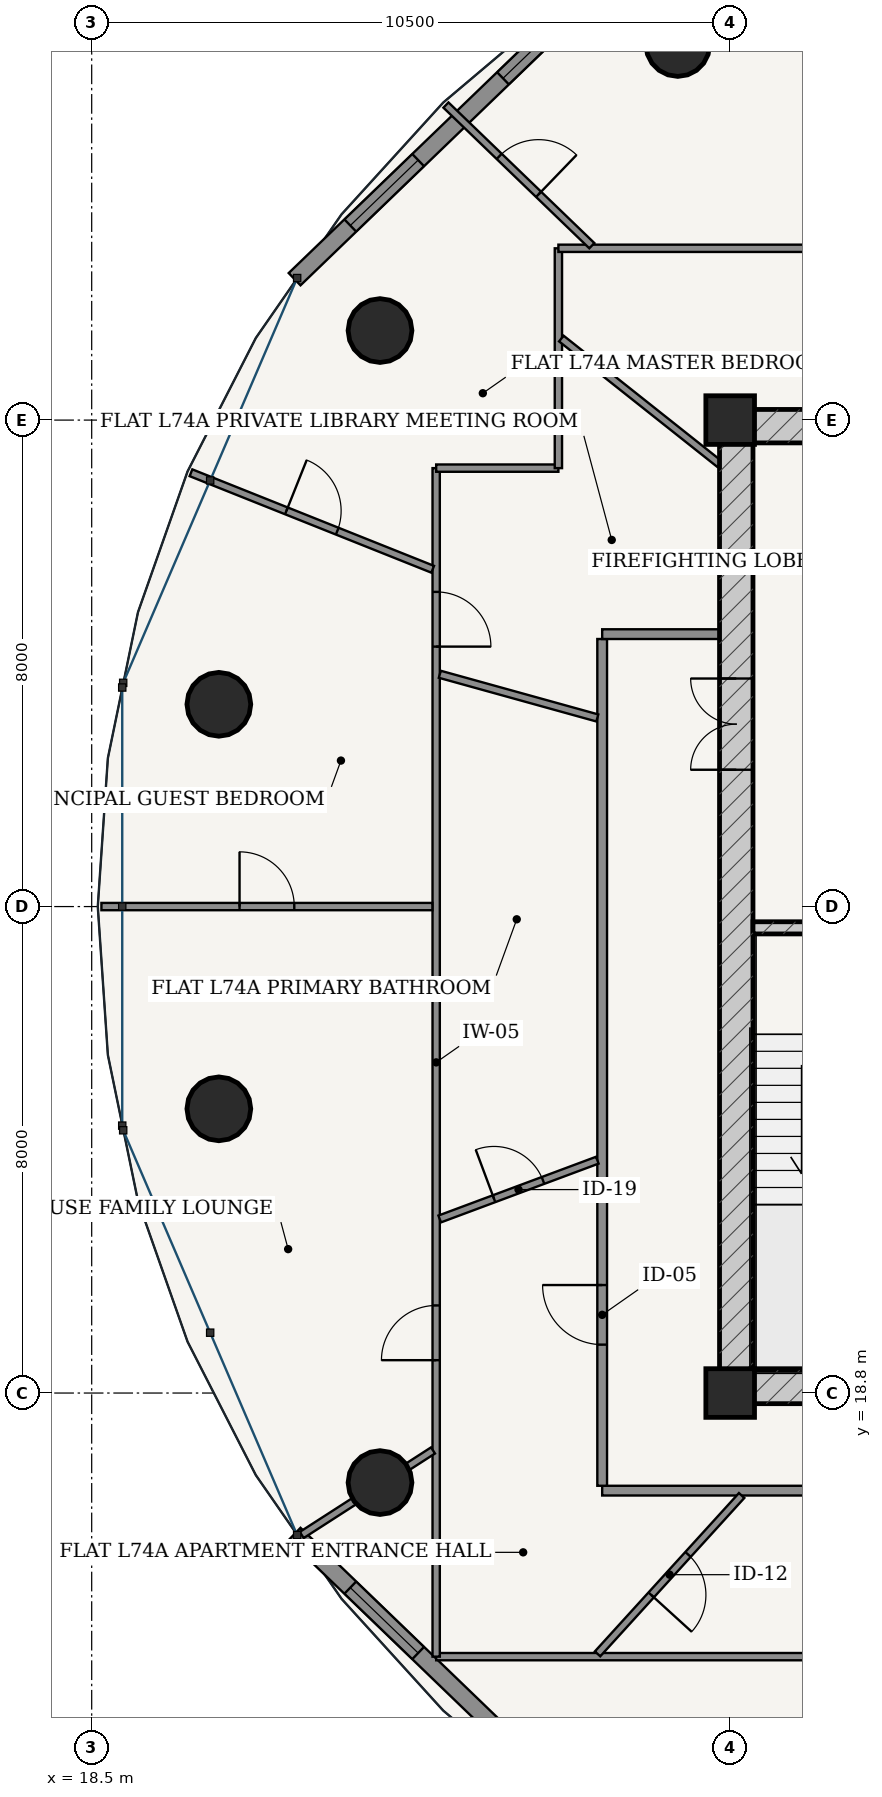
"""IFC4 building model, lengths in metres.
Left out: names, types, materials, properties, quantities, classifications, styles, units other than length and angle.
Written with IfcOpenShell. Run it as: python <this file> out.ifc"""

import sys

from ifc_helpers import new_model, si_unit, direction, frame, frame_2d, origin, origin_2d, place, context, subcontext, project, spatial, rectangle, hollow_circle, extrude, source, transform, mapped, element, fill, save


model = new_model("IFC4")
c1 = context("Model", 3, precision=1e-05, world=origin(), true_north=direction((-0.2419218956, 0.970295726276)))
c2 = subcontext(c1, "Body", "Model", "MODEL_VIEW")
j1 = project(units=[si_unit("LENGTHUNIT", "METRE"), si_unit("PLANEANGLEUNIT", "RADIAN")], contexts=[c1])
p1 = place(None, origin())
s1 = spatial("IfcSite", under=j1, at=p1, CompositionType="ELEMENT")
p2 = place(p1, origin())
s2 = spatial("IfcBuilding", under=s1, at=p2, CompositionType="ELEMENT")
p3 = place(p2, frame((0.0, 0.0, 281.95)))
s3 = spatial("IfcBuildingStorey", under=s2, at=p3, CompositionType="ELEMENT", Elevation=281.95)
for number, where, z_axis, x_axis in (
    (1, (29.0, 18.8, 0.0), (0.0, 0.0, 1.0), (1.0, 0.0, 0.0)),
    (2, (29.0, 34.8, 0.0), (0.0, 0.0, 1.0), (1.0, 0.0, 0.0)),
):
    element("IfcColumn", number, at=place(p3, frame(where, z_axis=z_axis, x_axis=x_axis)), inside=s3, PredefinedType="COLUMN", context=c2, shape_type="SweptSolid", body=[
        extrude(rectangle(XDim=0.8, YDim=0.8, at=origin_2d()), origin(), (0.0, 0.0, 1.0), 3.75),
    ])
p4 = place(p3, frame((28.825, 18.9, 0.0), z_axis=(0.0, 0.0, 1.0), x_axis=(1.0, 0.0, 0.0)))
e3 = element("IfcWall", 3, at=p4, inside=s3, PredefinedType="SHEAR", context=c2, shape_type="SweptSolid", body=[
    extrude(rectangle(XDim=18.35, YDim=0.55, at=frame_2d((9.175, 0.0))), origin(), (0.0, 0.0, 1.0), 3.49),
])
p5 = place(p4, frame((7.41, 0.0, 0.0)))
e4 = element("IfcOpeningElement", 4, at=p5, cuts=e3, PredefinedType="OPENING", context=c2, shape_type="SweptSolid", body=[
    extrude(rectangle(XDim=0.85, YDim=2.1, at=frame_2d((0.425, 1.05))), frame((0.0, 0.285, 0.0), z_axis=(0.0, -1.0, 0.0), x_axis=(1.0, 0.0, 0.0)), (0.0, 0.0, 1.0), 0.57),
])
p6 = place(p4, frame((10.49, 0.0, 0.0)))
e5 = element("IfcOpeningElement", 5, at=p6, cuts=e3, PredefinedType="OPENING", context=c2, shape_type="SweptSolid", body=[
    extrude(rectangle(XDim=0.85, YDim=2.1, at=frame_2d((0.425, 1.05))), frame((0.0, 0.285, 0.0), z_axis=(0.0, -1.0, 0.0), x_axis=(1.0, 0.0, 0.0)), (0.0, 0.0, 1.0), 0.57),
])
p7 = place(p3, frame((28.825, 34.7, 0.0), z_axis=(0.0, 0.0, 1.0), x_axis=(1.0, 0.0, 0.0)))
e6 = element("IfcWall", 6, at=p7, inside=s3, PredefinedType="SHEAR", context=c2, shape_type="SweptSolid", body=[
    extrude(rectangle(XDim=18.35, YDim=0.55, at=frame_2d((9.175, 0.0))), origin(), (0.0, 0.0, 1.0), 3.49),
])
p8 = place(p3, frame((29.1, 19.175, 0.0), z_axis=(0.0, 0.0, 1.0), x_axis=(0.0, 1.0, 0.0)))
e7 = element("IfcWall", 7, at=p8, inside=s3, PredefinedType="SHEAR", context=c2, shape_type="SweptSolid", body=[
    extrude(rectangle(XDim=15.25, YDim=0.55, at=frame_2d((7.625, 0.0))), origin(), (0.0, 0.0, 1.0), 3.49),
])
p9 = place(p8, frame((9.875, 0.0, 0.0)))
e8 = element("IfcOpeningElement", 8, at=p9, cuts=e7, PredefinedType="OPENING", context=c2, shape_type="SweptSolid", body=[
    extrude(rectangle(XDim=1.5, YDim=2.2, at=frame_2d((0.75, 1.1))), frame((0.0, 0.285, 0.0), z_axis=(0.0, -1.0, 0.0), x_axis=(1.0, 0.0, 0.0)), (0.0, 0.0, 1.0), 0.57),
])
p10 = place(p3, frame((29.375, 26.45, 0.0), z_axis=(0.0, 0.0, 1.0), x_axis=(1.0, 0.0, 0.0)))
e9 = element("IfcWall", 9, at=p10, inside=s3, PredefinedType="SOLIDWALL", context=c2, shape_type="SweptSolid", body=[
    extrude(rectangle(XDim=3.32, YDim=0.2, at=frame_2d((1.66, 0.0))), origin(), (0.0, 0.0, 1.0), 3.49),
])
p11 = place(p10, frame((1.185, 0.0, 0.0)))
e10 = element("IfcOpeningElement", 10, at=p11, cuts=e9, PredefinedType="OPENING", context=c2, shape_type="SweptSolid", body=[
    extrude(rectangle(XDim=0.95, YDim=2.15, at=frame_2d((0.475, 1.075))), frame((0.0, 0.11, 0.0), z_axis=(0.0, -1.0, 0.0), x_axis=(1.0, 0.0, 0.0)), (0.0, 0.0, 1.0), 0.22),
])
for number, where, z_axis, x_axis in (
    (11, (28.139, 40.977, 0.0), (0.0, 0.0, 1.0), (1.0, 0.0, 0.0)),
    (12, (23.241, 36.272, 0.0), (0.0, 0.0, 1.0), (1.0, 0.0, 0.0)),
    (13, (20.591, 30.126, 0.0), (0.0, 0.0, 1.0), (1.0, 0.0, 0.0)),
    (14, (20.591, 23.474, 0.0), (0.0, 0.0, 1.0), (1.0, 0.0, 0.0)),
    (15, (23.241, 17.328, 0.0), (0.0, 0.0, 1.0), (1.0, 0.0, 0.0)),
):
    element("IfcColumn", number, at=place(p3, frame(where, z_axis=z_axis, x_axis=x_axis)), inside=s3, PredefinedType="COLUMN", context=c2, shape_type="SweptSolid", body=[
        extrude(hollow_circle(Radius=0.525, WallThickness=0.035, at=origin_2d()), origin(), (0.0, 0.0, 1.0), 3.75),
    ])
p12 = place(p3, frame((27.296, 42.379, 0.0), z_axis=(0.0, 0.0, 1.0), x_axis=(-0.719979309073, -0.693995529169, 0.0)))
e16 = element("IfcWall", 16, at=p12, inside=s3, PredefinedType="SOLIDWALL", context=c2, shape_type="SweptSolid", body=[
    extrude(rectangle(XDim=7.583, YDim=0.28, at=frame_2d((3.791, 0.0))), origin(), (0.0, 0.0, 1.0), 3.49),
])
p13 = place(p12, frame((1.272, 0.0, 0.85)))
e17 = element("IfcOpeningElement", 17, at=p13, cuts=e16, PredefinedType="OPENING", context=c2, shape_type="SweptSolid", body=[
    extrude(rectangle(XDim=1.55, YDim=1.95, at=frame_2d((0.775, 0.975))), frame((0.0, 0.15, 0.0), z_axis=(0.0, -1.0, 0.0), x_axis=(1.0, 0.0, 0.0)), (0.0, 0.0, 1.0), 0.3),
])
p14 = place(p12, frame((4.76, 0.0, 0.85)))
e18 = element("IfcOpeningElement", 18, at=p14, cuts=e16, PredefinedType="OPENING", context=c2, shape_type="SweptSolid", body=[
    extrude(rectangle(XDim=1.55, YDim=1.95, at=frame_2d((0.775, 0.975))), frame((0.0, 0.15, 0.0), z_axis=(0.0, -1.0, 0.0), x_axis=(1.0, 0.0, 0.0)), (0.0, 0.0, 1.0), 0.3),
])
p15 = place(p3, frame((21.837, 16.483, 0.0), z_axis=(0.0, 0.0, 1.0), x_axis=(0.719995397366, -0.69397883813, 0.0)))
e19 = element("IfcWall", 19, at=p15, inside=s3, PredefinedType="SOLIDWALL", context=c2, shape_type="SweptSolid", body=[
    extrude(rectangle(XDim=7.582, YDim=0.28, at=frame_2d((3.791, 0.0))), origin(), (0.0, 0.0, 1.0), 3.49),
])
p16 = place(p15, frame((1.272, 0.0, 0.85)))
e20 = element("IfcOpeningElement", 20, at=p16, cuts=e19, PredefinedType="OPENING", context=c2, shape_type="SweptSolid", body=[
    extrude(rectangle(XDim=1.55, YDim=1.95, at=frame_2d((0.775, 0.975))), frame((0.0, 0.15, 0.0), z_axis=(0.0, -1.0, 0.0), x_axis=(1.0, 0.0, 0.0)), (0.0, 0.0, 1.0), 0.3),
])
p17 = place(p15, frame((4.76, 0.0, 0.85)))
e21 = element("IfcOpeningElement", 21, at=p17, cuts=e19, PredefinedType="OPENING", context=c2, shape_type="SweptSolid", body=[
    extrude(rectangle(XDim=1.55, YDim=1.95, at=frame_2d((0.775, 0.975))), frame((0.0, 0.15, 0.0), z_axis=(0.0, -1.0, 0.0), x_axis=(1.0, 0.0, 0.0)), (0.0, 0.0, 1.0), 0.3),
])
p18 = place(p3, frame((26.895, 17.195, 0.0), z_axis=(0.0, 0.0, 1.0), x_axis=(1.0, 0.0, 0.0)))
e22 = element("IfcWall", 22, at=p18, inside=s3, PredefinedType="PARTITIONING", context=c2, shape_type="SweptSolid", body=[
    extrude(rectangle(XDim=22.21, YDim=0.16, at=frame_2d((11.105, 0.0))), origin(), (0.0, 0.0, 1.0), 3.015),
])
p19 = place(p18, frame((17.365, 0.0, 0.0)))
e23 = element("IfcOpeningElement", 23, at=p19, cuts=e22, PredefinedType="OPENING", context=c2, shape_type="SweptSolid", body=[
    extrude(rectangle(XDim=0.98, YDim=2.2, at=frame_2d((0.49, 1.1))), frame((0.0, 0.09, 0.0), z_axis=(0.0, -1.0, 0.0), x_axis=(1.0, 0.0, 0.0)), (0.0, 0.0, 1.0), 0.18),
])
p20 = place(p3, frame((26.895, 17.275, 0.0), z_axis=(0.0, 0.0, 1.0), x_axis=(0.0, 1.0, 0.0)))
e24 = element("IfcWall", 24, at=p20, inside=s3, PredefinedType="PARTITIONING", context=c2, shape_type="SweptSolid", body=[
    extrude(rectangle(XDim=13.925, YDim=0.16, at=frame_2d((6.962, 0.0))), origin(), (0.0, 0.0, 1.0), 3.015),
])
p21 = place(p20, frame((2.321, 0.0, 0.0)))
e25 = element("IfcOpeningElement", 25, at=p21, cuts=e24, PredefinedType="OPENING", context=c2, shape_type="SweptSolid", body=[
    extrude(rectangle(XDim=0.98, YDim=2.2, at=frame_2d((0.49, 1.1))), frame((0.0, 0.09, 0.0), z_axis=(0.0, -1.0, 0.0), x_axis=(1.0, 0.0, 0.0)), (0.0, 0.0, 1.0), 0.18),
])
p22 = place(p3, frame((26.895, 31.28, 0.0), z_axis=(0.0, 0.0, 1.0), x_axis=(1.0, 0.0, 0.0)))
e26 = element("IfcWall", 26, at=p22, inside=s3, PredefinedType="PARTITIONING", context=c2, shape_type="SweptSolid", body=[
    extrude(rectangle(XDim=1.93, YDim=0.16, at=frame_2d((0.965, 0.0))), origin(), (0.0, 0.0, 1.0), 3.49),
])
p23 = place(p3, frame((35.353, 14.465, 0.0), z_axis=(0.0, 0.0, 1.0), x_axis=(-1.0, 0.0, 0.0)))
e27 = element("IfcWall", 27, at=p23, inside=s3, PredefinedType="PARTITIONING", context=c2, shape_type="SweptSolid", body=[
    extrude(rectangle(XDim=11.188, YDim=0.12, at=frame_2d((5.594, 0.0))), origin(), (0.0, 0.0, 1.0), 3.015),
])
p24 = place(p23, frame((3.997, 0.0, 0.0)))
e28 = element("IfcOpeningElement", 28, at=p24, cuts=e27, PredefinedType="OPENING", context=c2, shape_type="SweptSolid", body=[
    extrude(rectangle(XDim=0.9, YDim=2.15, at=frame_2d((0.45, 1.075))), frame((0.0, 0.07, 0.0), z_axis=(0.0, -1.0, 0.0), x_axis=(1.0, 0.0, 0.0)), (0.0, 0.0, 1.0), 0.14),
])
p25 = place(p3, frame((24.165, 14.465, 0.0), z_axis=(0.0, 0.0, 1.0), x_axis=(0.0, 1.0, 0.0)))
e29 = element("IfcWall", 29, at=p25, inside=s3, PredefinedType="PARTITIONING", context=c2, shape_type="SweptSolid", body=[
    extrude(rectangle(XDim=19.545, YDim=0.12, at=frame_2d((9.772, 0.0))), origin(), (0.0, 0.0, 1.0), 3.015),
])
p26 = place(p25, frame((4.875, 0.0, 0.0)))
e30 = element("IfcOpeningElement", 30, at=p26, cuts=e29, PredefinedType="OPENING", context=c2, shape_type="SweptSolid", body=[
    extrude(rectangle(XDim=0.9, YDim=2.15, at=frame_2d((0.45, 1.075))), frame((0.0, 0.07, 0.0), z_axis=(0.0, -1.0, 0.0), x_axis=(1.0, 0.0, 0.0)), (0.0, 0.0, 1.0), 0.14),
])
p27 = place(p25, frame((16.61, 0.0, 0.0)))
e31 = element("IfcOpeningElement", 31, at=p27, cuts=e29, PredefinedType="OPENING", context=c2, shape_type="SweptSolid", body=[
    extrude(rectangle(XDim=0.9, YDim=2.15, at=frame_2d((0.45, 1.075))), frame((0.0, 0.07, 0.0), z_axis=(0.0, -1.0, 0.0), x_axis=(1.0, 0.0, 0.0)), (0.0, 0.0, 1.0), 0.14),
])
p28 = place(p3, frame((24.165, 34.01, 0.0), z_axis=(0.0, 0.0, 1.0), x_axis=(1.0, 0.0, 0.0)))
e32 = element("IfcWall", 32, at=p28, inside=s3, PredefinedType="PARTITIONING", context=c2, shape_type="SweptSolid", body=[
    extrude(rectangle(XDim=2.01, YDim=0.12, at=frame_2d((1.005, 0.0))), origin(), (0.0, 0.0, 1.0), 3.209),
])
p29 = place(p3, frame((26.175, 34.01, 0.0), z_axis=(0.0, 0.0, 1.0), x_axis=(0.0, 1.0, 0.0)))
e33 = element("IfcWall", 33, at=p29, inside=s3, PredefinedType="PARTITIONING", context=c2, shape_type="SweptSolid", body=[
    extrude(rectangle(XDim=3.615, YDim=0.12, at=frame_2d((1.808, 0.0))), origin(), (0.0, 0.0, 1.0), 3.015),
])
p30 = place(p3, frame((26.175, 37.625, 0.0), z_axis=(0.0, 0.0, 1.0), x_axis=(1.0, 0.0, 0.0)))
e34 = element("IfcWall", 34, at=p30, inside=s3, PredefinedType="PARTITIONING", context=c2, shape_type="SweptSolid", body=[
    extrude(rectangle(XDim=13.957, YDim=0.12, at=frame_2d((6.979, 0.0))), origin(), (0.0, 0.0, 1.0), 3.015),
])
p31 = place(p30, frame((10.852, 0.0, 0.0)))
e35 = element("IfcOpeningElement", 35, at=p31, cuts=e34, PredefinedType="OPENING", context=c2, shape_type="SweptSolid", body=[
    extrude(rectangle(XDim=0.86, YDim=2.15, at=frame_2d((0.43, 1.075))), frame((0.0, 0.07, 0.0), z_axis=(0.0, -1.0, 0.0), x_axis=(1.0, 0.0, 0.0)), (0.0, 0.0, 1.0), 0.14),
])
p32 = place(p30, frame((4.183, 0.0, 0.0)))
e36 = element("IfcOpeningElement", 36, at=p32, cuts=e34, PredefinedType="OPENING", context=c2, shape_type="SweptSolid", body=[
    extrude(rectangle(XDim=0.9, YDim=2.15, at=frame_2d((0.45, 1.075))), frame((0.0, 0.07, 0.0), z_axis=(0.0, -1.0, 0.0), x_axis=(1.0, 0.0, 0.0)), (0.0, 0.0, 1.0), 0.14),
])
p33 = place(p3, frame((26.725, 37.668, 0.0), z_axis=(0.0, 0.0, 1.0), x_axis=(-0.719954096891, 0.694021684366, 0.0)))
e37 = element("IfcWall", 37, at=p33, inside=s3, PredefinedType="PARTITIONING", context=c2, shape_type="SweptSolid", body=[
    extrude(rectangle(XDim=3.333, YDim=0.12, at=frame_2d((1.667, 0.0))), origin(), (0.0, 0.0, 1.0), 3.121),
])
p34 = place(p33, frame((1.216, 0.0, 0.0)))
e38 = element("IfcOpeningElement", 38, at=p34, cuts=e37, PredefinedType="OPENING", context=c2, shape_type="SweptSolid", body=[
    extrude(rectangle(XDim=0.9, YDim=2.15, at=frame_2d((0.45, 1.075))), frame((0.0, 0.07, 0.0), z_axis=(0.0, -1.0, 0.0), x_axis=(1.0, 0.0, 0.0)), (0.0, 0.0, 1.0), 0.14),
])
p35 = place(p3, frame((24.107, 32.347, 0.0), z_axis=(0.0, 0.0, 1.0), x_axis=(-0.928712556691, 0.370800467966, 0.0)))
e39 = element("IfcWall", 39, at=p35, inside=s3, PredefinedType="PARTITIONING", context=c2, shape_type="SweptSolid", body=[
    extrude(rectangle(XDim=4.28, YDim=0.12, at=frame_2d((2.14, 0.0))), origin(), (0.0, 0.0, 1.0), 3.121),
])
p36 = place(p35, frame((1.69, 0.0, 0.0)))
e40 = element("IfcOpeningElement", 40, at=p36, cuts=e39, PredefinedType="OPENING", context=c2, shape_type="SweptSolid", body=[
    extrude(rectangle(XDim=0.9, YDim=2.15, at=frame_2d((0.45, 1.075))), frame((0.0, 0.07, 0.0), z_axis=(0.0, -1.0, 0.0), x_axis=(1.0, 0.0, 0.0)), (0.0, 0.0, 1.0), 0.14),
])
p37 = place(p3, frame((24.103, 26.8, 0.0), z_axis=(0.0, 0.0, 1.0), x_axis=(-1.0, 0.0, 0.0)))
e41 = element("IfcWall", 41, at=p37, inside=s3, PredefinedType="PARTITIONING", context=c2, shape_type="SweptSolid", body=[
    extrude(rectangle(XDim=5.443, YDim=0.12, at=frame_2d((2.722, 0.0))), origin(), (0.0, 0.0, 1.0), 3.121),
])
p38 = place(p37, frame((2.271, 0.0, 0.0)))
e42 = element("IfcOpeningElement", 42, at=p38, cuts=e41, PredefinedType="OPENING", context=c2, shape_type="SweptSolid", body=[
    extrude(rectangle(XDim=0.9, YDim=2.15, at=frame_2d((0.45, 1.075))), frame((0.0, 0.07, 0.0), z_axis=(0.0, -1.0, 0.0), x_axis=(1.0, 0.0, 0.0)), (0.0, 0.0, 1.0), 0.14),
])
p39 = place(p3, frame((24.113, 17.856, 0.0), z_axis=(0.0, 0.0, 1.0), x_axis=(-0.840708587197, -0.54148783127, 0.0)))
e43 = element("IfcWall", 43, at=p39, inside=s3, PredefinedType="PARTITIONING", context=c2, shape_type="SweptSolid", body=[
    extrude(rectangle(XDim=2.568, YDim=0.12, at=frame_2d((1.284, 0.0))), origin(), (0.0, 0.0, 1.0), 3.015),
])
p40 = place(p3, frame((28.825, 34.077, 0.0), z_axis=(0.0, 0.0, 1.0), x_axis=(-0.783444596274, 0.621461635637, 0.0)))
e44 = element("IfcWall", 44, at=p40, inside=s3, PredefinedType="PARTITIONING", context=c2, shape_type="SweptSolid", body=[
    extrude(rectangle(XDim=3.32, YDim=0.12, at=frame_2d((1.66, 0.0))), origin(), (0.0, 0.0, 1.0), 3.209),
])
p41 = place(p3, frame((26.815, 29.902, 0.0), z_axis=(0.0, 0.0, 1.0), x_axis=(-0.963610243268, 0.267311240073, 0.0)))
e45 = element("IfcWall", 45, at=p41, inside=s3, PredefinedType="PARTITIONING", context=c2, shape_type="SweptSolid", body=[
    extrude(rectangle(XDim=2.688, YDim=0.12, at=frame_2d((1.344, 0.0))), origin(), (0.0, 0.0, 1.0), 3.209),
])
p42 = place(p3, frame((26.815, 22.629, 0.0), z_axis=(0.0, 0.0, 1.0), x_axis=(-0.93696600231, -0.349420535338, 0.0)))
e46 = element("IfcWall", 46, at=p42, inside=s3, PredefinedType="PARTITIONING", context=c2, shape_type="SweptSolid", body=[
    extrude(rectangle(XDim=2.766, YDim=0.12, at=frame_2d((1.383, 0.0))), origin(), (0.0, 0.0, 1.0), 3.209),
])
p43 = place(p42, frame((0.953, 0.0, 0.0)))
e47 = element("IfcOpeningElement", 47, at=p43, cuts=e46, PredefinedType="OPENING", context=c2, shape_type="SweptSolid", body=[
    extrude(rectangle(XDim=0.86, YDim=2.15, at=frame_2d((0.43, 1.075))), frame((0.0, 0.07, 0.0), z_axis=(0.0, -1.0, 0.0), x_axis=(1.0, 0.0, 0.0)), (0.0, 0.0, 1.0), 0.14),
])
p44 = place(p3, frame((29.188, 17.115, 0.0), z_axis=(0.0, 0.0, 1.0), x_axis=(-0.67292817107, -0.739707831904, 0.0)))
e48 = element("IfcWall", 48, at=p44, inside=s3, PredefinedType="PARTITIONING", context=c2, shape_type="SweptSolid", body=[
    extrude(rectangle(XDim=3.521, YDim=0.12, at=frame_2d((1.76, 0.0))), origin(), (0.0, 0.0, 1.0), 3.015),
])
p45 = place(p44, frame((1.31, 0.0, 0.0)))
e49 = element("IfcOpeningElement", 49, at=p45, cuts=e48, PredefinedType="OPENING", context=c2, shape_type="SweptSolid", body=[
    extrude(rectangle(XDim=0.9, YDim=2.15, at=frame_2d((0.45, 1.075))), frame((0.0, 0.07, 0.0), z_axis=(0.0, -1.0, 0.0), x_axis=(1.0, 0.0, 0.0)), (0.0, 0.0, 1.0), 0.14),
])
m1 = source(origin(), c2, "Body", "SweptSolid", [
    extrude(rectangle(XDim=1.55, YDim=1.95, at=frame_2d((0.775, 0.975))), frame((0.0, 0.03, 0.0), z_axis=(0.0, -1.0, 0.0), x_axis=(1.0, 0.0, 0.0)), (0.0, 0.0, 1.0), 0.06),
])
p46 = place(p13, origin())
e50 = element("IfcWindow", 50, at=p46, inside=s3, PartitioningType="SINGLE_PANEL", PredefinedType="WINDOW", context=c2, shape_type="MappedRepresentation", body=[
    mapped(m1, transform((0.0, 0.0, 0.0), scale=1.0)),
])
fill(e17, e50)
p47 = place(p14, origin())
e51 = element("IfcWindow", 51, at=p47, inside=s3, PartitioningType="SINGLE_PANEL", PredefinedType="WINDOW", context=c2, shape_type="MappedRepresentation", body=[
    mapped(m1, transform((0.0, 0.0, 0.0), scale=1.0)),
])
fill(e18, e51)
p48 = place(p16, origin())
e52 = element("IfcWindow", 52, at=p48, inside=s3, PartitioningType="SINGLE_PANEL", PredefinedType="WINDOW", context=c2, shape_type="MappedRepresentation", body=[
    mapped(m1, transform((0.0, 0.0, 0.0), scale=1.0)),
])
fill(e20, e52)
m2 = source(origin(), c2, "Body", "SweptSolid", [
    extrude(rectangle(XDim=1.5, YDim=2.2, at=frame_2d((0.75, 1.1))), frame((0.0, 0.025, 0.0), z_axis=(0.0, -1.0, 0.0), x_axis=(1.0, 0.0, 0.0)), (0.0, 0.0, 1.0), 0.05),
])
p49 = place(p9, origin())
e53 = element("IfcDoor", 53, at=p49, inside=s3, OperationType="DOUBLE_DOOR_SINGLE_SWING", PredefinedType="DOOR", context=c2, shape_type="MappedRepresentation", body=[
    mapped(m2, transform((0.0, 0.0, 0.0), scale=1.0)),
])
fill(e8, e53)
m3 = source(origin(), c2, "Body", "SweptSolid", [
    extrude(rectangle(XDim=0.98, YDim=2.2, at=frame_2d((0.49, 1.1))), frame((0.0, 0.025, 0.0), z_axis=(0.0, -1.0, 0.0), x_axis=(1.0, 0.0, 0.0)), (0.0, 0.0, 1.0), 0.05),
])
p50 = place(p21, origin())
e54 = element("IfcDoor", 54, at=p50, inside=s3, OperationType="SINGLE_SWING_RIGHT", PredefinedType="DOOR", context=c2, shape_type="MappedRepresentation", body=[
    mapped(m3, transform((0.0, 0.0, 0.0), scale=1.0)),
])
fill(e25, e54)
m4 = source(origin(), c2, "Body", "SweptSolid", [
    extrude(rectangle(XDim=0.86, YDim=2.15, at=frame_2d((0.43, 1.075))), frame((0.0, 0.025, 0.0), z_axis=(0.0, -1.0, 0.0), x_axis=(1.0, 0.0, 0.0)), (0.0, 0.0, 1.0), 0.05),
])
p51 = place(p43, frame((0.86, 0.0, 0.0), z_axis=(0.0, 0.0, 1.0), x_axis=(-1.0, 0.0, 0.0)))
e55 = element("IfcDoor", 55, at=p51, inside=s3, OperationType="SINGLE_SWING_LEFT", PredefinedType="DOOR", context=c2, shape_type="MappedRepresentation", body=[
    mapped(m4, transform((0.0, 0.0, 0.0), scale=1.0)),
])
fill(e47, e55)
m5 = source(origin(), c2, "Body", "SweptSolid", [
    extrude(rectangle(XDim=0.9, YDim=2.15, at=frame_2d((0.45, 1.075))), frame((0.0, 0.025, 0.0), z_axis=(0.0, -1.0, 0.0), x_axis=(1.0, 0.0, 0.0)), (0.0, 0.0, 1.0), 0.05),
])
p52 = place(p45, origin())
e56 = element("IfcDoor", 56, at=p52, inside=s3, OperationType="SINGLE_SWING_RIGHT", PredefinedType="DOOR", context=c2, shape_type="MappedRepresentation", body=[
    mapped(m5, transform((0.0, 0.0, 0.0), scale=1.0)),
])
fill(e49, e56)
p53 = place(p26, origin())
e57 = element("IfcDoor", 57, at=p53, inside=s3, OperationType="SINGLE_SWING_LEFT", PredefinedType="DOOR", context=c2, shape_type="MappedRepresentation", body=[
    mapped(m5, transform((0.0, 0.0, 0.0), scale=1.0)),
])
fill(e30, e57)
p54 = place(p38, frame((0.9, 0.0, 0.0), z_axis=(0.0, 0.0, 1.0), x_axis=(-1.0, 0.0, 0.0)))
e58 = element("IfcDoor", 58, at=p54, inside=s3, OperationType="SINGLE_SWING_LEFT", PredefinedType="DOOR", context=c2, shape_type="MappedRepresentation", body=[
    mapped(m5, transform((0.0, 0.0, 0.0), scale=1.0)),
])
fill(e42, e58)
p55 = place(p27, frame((0.9, 0.0, 0.0), z_axis=(0.0, 0.0, 1.0), x_axis=(-1.0, 0.0, 0.0)))
e59 = element("IfcDoor", 59, at=p55, inside=s3, OperationType="SINGLE_SWING_RIGHT", PredefinedType="DOOR", context=c2, shape_type="MappedRepresentation", body=[
    mapped(m5, transform((0.0, 0.0, 0.0), scale=1.0)),
])
fill(e31, e59)
p56 = place(p36, frame((0.9, 0.0, 0.0), z_axis=(0.0, 0.0, 1.0), x_axis=(-1.0, 0.0, 0.0)))
e60 = element("IfcDoor", 60, at=p56, inside=s3, OperationType="SINGLE_SWING_LEFT", PredefinedType="DOOR", context=c2, shape_type="MappedRepresentation", body=[
    mapped(m5, transform((0.0, 0.0, 0.0), scale=1.0)),
])
fill(e40, e60)
p57 = place(p34, frame((0.9, 0.0, 0.0), z_axis=(0.0, 0.0, 1.0), x_axis=(-1.0, 0.0, 0.0)))
e61 = element("IfcDoor", 61, at=p57, inside=s3, OperationType="SINGLE_SWING_RIGHT", PredefinedType="DOOR", context=c2, shape_type="MappedRepresentation", body=[
    mapped(m5, transform((0.0, 0.0, 0.0), scale=1.0)),
])
fill(e38, e61)
save(model, sys.argv[1])
